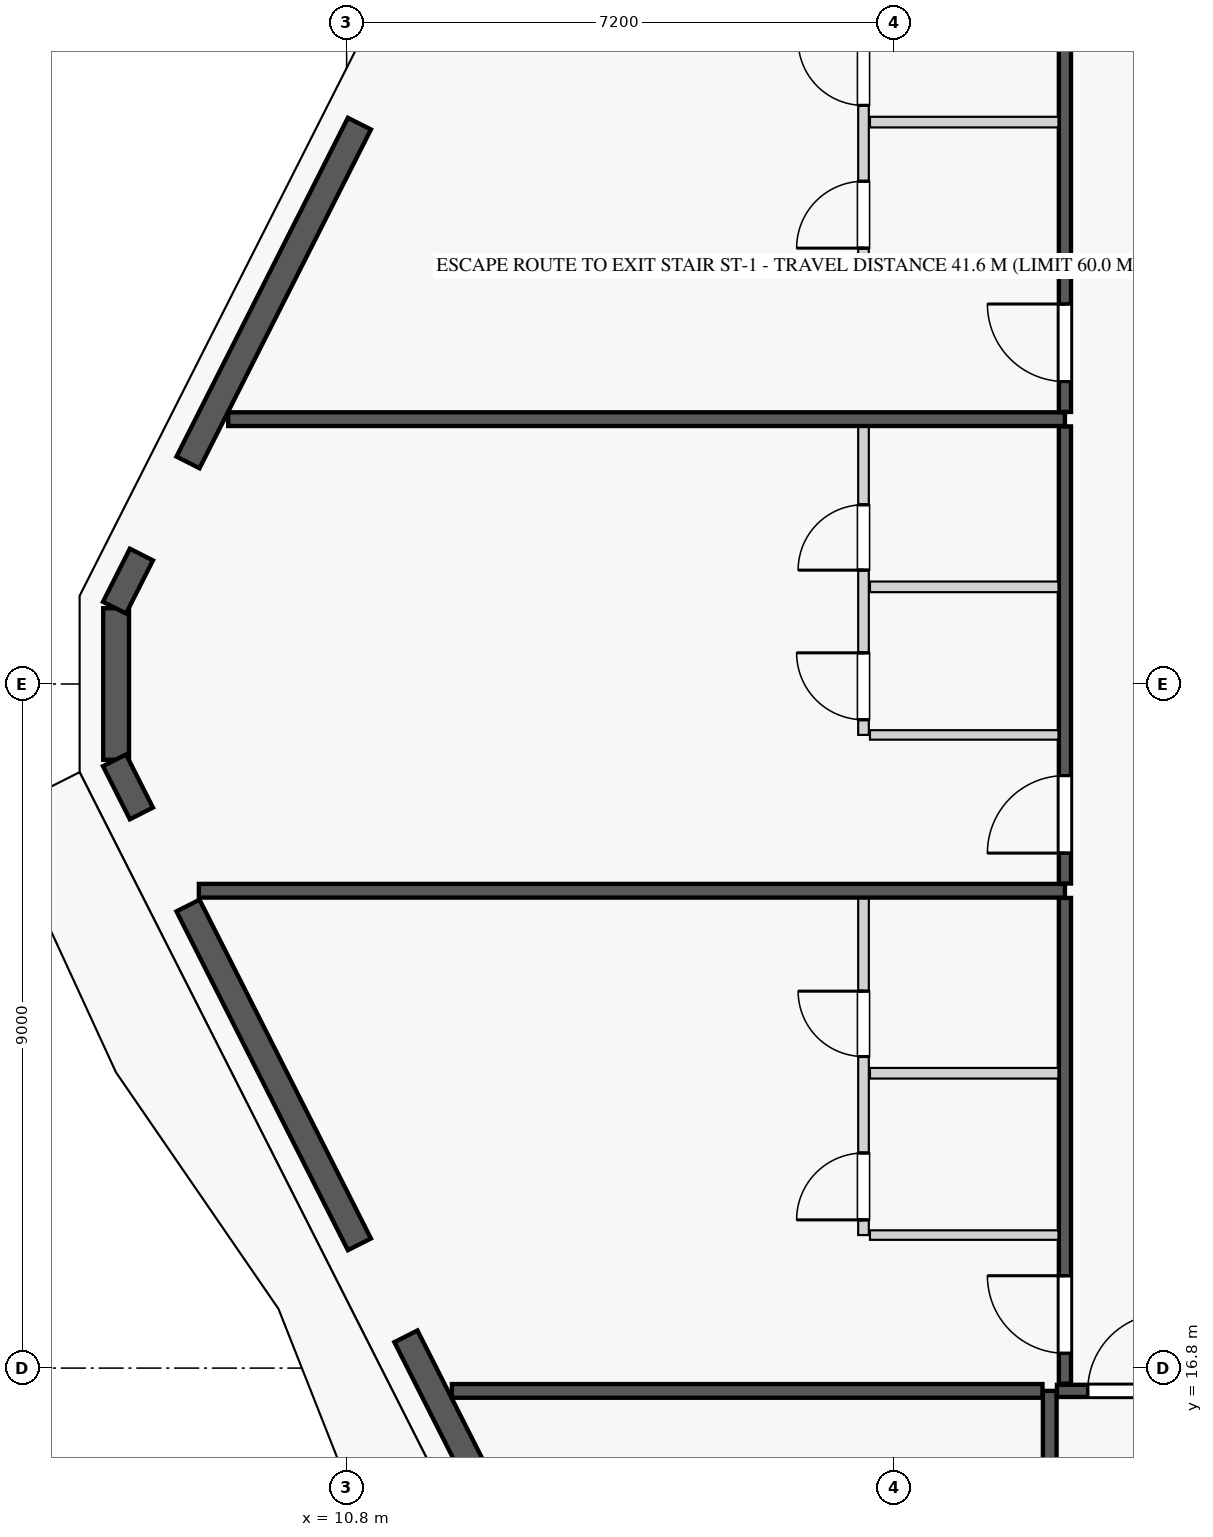
"""IFC4 building model, lengths in metres.
Left out: names, types, materials, properties, quantities, classifications, styles, units other than length and angle.
Written with IfcOpenShell. Run it as: python <this file> out.ifc"""

import sys

from ifc_helpers import new_model, si_unit, direction, frame, frame_2d, origin, origin_2d, place, context, subcontext, project, spatial, rectangle, extrude, element, fill, save


model = new_model("IFC4")
c1 = context("Model", 3, precision=1e-05, world=origin(), true_north=direction((0.0, 1.0)))
c2 = subcontext(c1, "Body", "Model", "MODEL_VIEW")
j1 = project(units=[si_unit("LENGTHUNIT", "METRE"), si_unit("PLANEANGLEUNIT", "RADIAN")], contexts=[c1])
p1 = place(None, origin())
s1 = spatial("IfcSite", under=j1, at=p1, CompositionType="ELEMENT")
p2 = place(p1, origin())
s2 = spatial("IfcBuilding", under=s1, at=p2, CompositionType="ELEMENT")
p3 = place(p2, frame((0.0, 0.0, 112.6)))
s3 = spatial("IfcBuildingStorey", under=s2, at=p3, CompositionType="ELEMENT", Elevation=112.6)
for number, where, z_axis, x_axis in (
    (1, (11.348, 33.776, 0.0), (0.0, 0.0, 1.0), (1.0, 0.0, 0.0)),
    (2, (8.443, 28.109, 0.0), (0.0, 0.0, 1.0), (1.0, 0.0, 0.0)),
    (3, (8.443, 23.491, 0.0), (0.0, 0.0, 1.0), (1.0, 0.0, 0.0)),
    (4, (11.348, 17.824, 0.0), (0.0, 0.0, 1.0), (1.0, 0.0, 0.0)),
):
    element("IfcColumn", number, at=place(p3, frame(where, z_axis=z_axis, x_axis=x_axis)), inside=s3, PredefinedType="COLUMN", context=c2, shape_type="SweptSolid", body=[
        extrude(rectangle(XDim=1.05, YDim=1.05, at=origin_2d()), origin(), (0.0, 0.0, 1.0), 3.55),
    ])
p4 = place(p3, frame((8.443, 25.8, 0.0), z_axis=(0.0, 0.0, 1.0), x_axis=(0.0, -1.0, 0.0)))
e5 = element("IfcColumn", 5, at=p4, inside=s3, PredefinedType="PILASTER", context=c2, shape_type="SweptSolid", body=[
    extrude(rectangle(XDim=0.5, YDim=0.35, at=origin_2d()), origin(), (0.0, 0.0, 1.0), 3.55),
])
p5 = place(p3, frame((7.767, 26.797, 0.0), z_axis=(0.0, 0.0, 1.0), x_axis=(0.0, -1.0, 0.0)))
e6 = element("IfcWall", 6, at=p5, inside=s3, PredefinedType="STANDARD", context=c2, shape_type="SweptSolid", body=[
    extrude(rectangle(XDim=1.994, YDim=0.34, at=frame_2d((0.997, 0.0))), origin(), (0.0, 0.0, 1.0), 3.34),
])
p6 = place(p5, frame((0.447, 0.0, 0.75)))
e7 = element("IfcOpeningElement", 7, at=p6, cuts=e6, PredefinedType="OPENING", context=c2, shape_type="SweptSolid", body=[
    extrude(rectangle(XDim=1.1, YDim=2.0, at=frame_2d((0.55, 1.0))), frame((0.0, 0.18, 0.0), z_axis=(0.0, -1.0, 0.0), x_axis=(1.0, 0.0, 0.0)), (0.0, 0.0, 1.0), 0.36),
])
p7 = place(p3, frame((10.968, 33.172, 0.0), z_axis=(0.0, 0.0, 1.0), x_axis=(-0.451470533039, -0.892286029139, 0.0)))
e8 = element("IfcWall", 8, at=p7, inside=s3, PredefinedType="STANDARD", context=c2, shape_type="SweptSolid", body=[
    extrude(rectangle(XDim=4.995, YDim=0.34, at=frame_2d((2.498, 0.0))), origin(), (0.0, 0.0, 1.0), 2.797),
])
p8 = place(p7, frame((1.947, 0.0, 0.75)))
e9 = element("IfcOpeningElement", 9, at=p8, cuts=e8, PredefinedType="OPENING", context=c2, shape_type="SweptSolid", body=[
    extrude(rectangle(XDim=1.1, YDim=1.897, at=frame_2d((0.55, 0.948))), frame((0.0, 0.18, 0.0), z_axis=(0.0, -1.0, 0.0), x_axis=(1.0, 0.0, 0.0)), (0.0, 0.0, 1.0), 0.36),
])
for number, where, z_axis, x_axis in (
    (10, (8.1, 27.503, 0.0), (0.0, 0.0, 1.0), (-0.452, -0.892, 0.0)),
    (11, (7.746, 24.796, 0.0), (0.0, 0.0, 1.0), (0.452, -0.892, 0.0)),
):
    element("IfcWall", number, at=place(p3, frame(where, z_axis=z_axis, x_axis=x_axis)), inside=s3, PredefinedType="STANDARD", context=c2, shape_type="SweptSolid", body=[
        extrude(rectangle(XDim=0.783, YDim=0.34, at=frame_2d((0.392, 0.0))), origin(), (0.0, 0.0, 1.0), 3.34),
    ])
p9 = place(p3, frame((8.713, 22.885, 0.0), z_axis=(0.0, 0.0, 1.0), x_axis=(0.451470533039, -0.892286029139, 0.0)))
e12 = element("IfcWall", 12, at=p9, inside=s3, PredefinedType="STANDARD", context=c2, shape_type="SweptSolid", body=[
    extrude(rectangle(XDim=4.995, YDim=0.34, at=frame_2d((2.498, 0.0))), origin(), (0.0, 0.0, 1.0), 2.797),
])
p10 = place(p9, frame((1.947, 0.0, 0.75)))
e13 = element("IfcOpeningElement", 13, at=p10, cuts=e12, PredefinedType="OPENING", context=c2, shape_type="SweptSolid", body=[
    extrude(rectangle(XDim=1.1, YDim=1.897, at=frame_2d((0.55, 0.948))), frame((0.0, 0.18, 0.0), z_axis=(0.0, -1.0, 0.0), x_axis=(1.0, 0.0, 0.0)), (0.0, 0.0, 1.0), 0.36),
])
p11 = place(p3, frame((11.58, 17.218, 0.0), z_axis=(0.0, 0.0, 1.0), x_axis=(0.451567731634, -0.892236842855, 0.0)))
e14 = element("IfcWall", 14, at=p11, inside=s3, PredefinedType="STANDARD", context=c2, shape_type="SweptSolid", body=[
    extrude(rectangle(XDim=5.219, YDim=0.34, at=frame_2d((2.61, 0.0))), origin(), (0.0, 0.0, 1.0), 2.797),
])
p12 = place(p11, frame((2.587, 0.0, 0.0)))
e15 = element("IfcOpeningElement", 15, at=p12, cuts=e14, PredefinedType="OPENING", context=c2, shape_type="SweptSolid", body=[
    extrude(rectangle(XDim=1.1, YDim=2.25, at=frame_2d((0.55, 1.125))), frame((0.0, 0.18, 0.0), z_axis=(0.0, -1.0, 0.0), x_axis=(1.0, 0.0, 0.0)), (0.0, 0.0, 1.0), 0.36),
])
p13 = place(p3, frame((20.05, 4.105, 0.0), z_axis=(0.0, 0.0, 1.0), x_axis=(0.0, 1.0, 0.0)))
e16 = element("IfcWall", 16, at=p13, inside=s3, PredefinedType="PARTITIONING", context=c2, shape_type="SweptSolid", body=[
    extrude(rectangle(XDim=12.395, YDim=0.18, at=frame_2d((6.198, 0.0))), origin(), (0.0, 0.0, 1.0), 3.34),
])
p14 = place(p3, frame((20.145, 16.5, 0.0), z_axis=(0.0, 0.0, 1.0), x_axis=(1.0, 0.0, 0.0)))
e17 = element("IfcWall", 17, at=p14, inside=s3, PredefinedType="PARTITIONING", context=c2, shape_type="SweptSolid", body=[
    extrude(rectangle(XDim=8.328, YDim=0.16, at=frame_2d((4.164, 0.0))), origin(), (0.0, 0.0, 1.0), 3.34),
])
p15 = place(p14, frame((0.405, 0.0, 0.0)))
e18 = element("IfcOpeningElement", 18, at=p15, cuts=e17, PredefinedType="OPENING", context=c2, shape_type="SweptSolid", body=[
    extrude(rectangle(XDim=1.02, YDim=2.25, at=frame_2d((0.51, 1.125))), frame((0.0, 0.09, 0.0), z_axis=(0.0, -1.0, 0.0), x_axis=(1.0, 0.0, 0.0)), (0.0, 0.0, 1.0), 0.18),
])
p16 = place(p3, frame((12.185, 16.5, 0.0), z_axis=(0.0, 0.0, 1.0), x_axis=(1.0, 0.0, 0.0)))
e19 = element("IfcWall", 19, at=p16, inside=s3, PredefinedType="PARTITIONING", context=c2, shape_type="SweptSolid", body=[
    extrude(rectangle(XDim=7.77, YDim=0.18, at=frame_2d((3.885, 0.0))), origin(), (0.0, 0.0, 1.0), 3.34),
])
p17 = place(p3, frame((20.25, 16.595, 0.0), z_axis=(0.0, 0.0, 1.0), x_axis=(0.0, 1.0, 0.0)))
e20 = element("IfcWall", 20, at=p17, inside=s3, PredefinedType="PARTITIONING", context=c2, shape_type="SweptSolid", body=[
    extrude(rectangle(XDim=6.39, YDim=0.16, at=frame_2d((3.195, 0.0))), origin(), (0.0, 0.0, 1.0), 3.34),
])
p18 = place(p17, frame((0.4, 0.0, 0.0)))
e21 = element("IfcOpeningElement", 21, at=p18, cuts=e20, PredefinedType="OPENING", context=c2, shape_type="SweptSolid", body=[
    extrude(rectangle(XDim=1.02, YDim=2.25, at=frame_2d((0.51, 1.125))), frame((0.0, 0.09, 0.0), z_axis=(0.0, -1.0, 0.0), x_axis=(1.0, 0.0, 0.0)), (0.0, 0.0, 1.0), 0.18),
])
p19 = place(p3, frame((17.685, 18.55, 0.0), z_axis=(0.0, 0.0, 1.0), x_axis=(1.0, 0.0, 0.0)))
e22 = element("IfcWall", 22, at=p19, inside=s3, PredefinedType="PARTITIONING", context=c2, shape_type="SweptSolid", body=[
    extrude(rectangle(XDim=2.48, YDim=0.125, at=frame_2d((1.24, 0.0))), origin(), (0.0, 0.0, 1.0), 2.722),
])
p20 = place(p3, frame((17.6, 18.55, 0.0), z_axis=(0.0, 0.0, 1.0), x_axis=(0.0, 1.0, 0.0)))
e23 = element("IfcWall", 23, at=p20, inside=s3, PredefinedType="PLUMBINGWALL", context=c2, shape_type="SweptSolid", body=[
    extrude(rectangle(XDim=4.435, YDim=0.14, at=frame_2d((2.218, 0.0))), origin(), (0.0, 0.0, 1.0), 3.34),
])
p21 = place(p20, frame((2.349, 0.0, 0.0)))
e24 = element("IfcOpeningElement", 24, at=p21, cuts=e23, PredefinedType="OPENING", context=c2, shape_type="SweptSolid", body=[
    extrude(rectangle(XDim=0.86, YDim=2.1, at=frame_2d((0.43, 1.05))), frame((0.0, 0.08, 0.0), z_axis=(0.0, -1.0, 0.0), x_axis=(1.0, 0.0, 0.0)), (0.0, 0.0, 1.0), 0.16),
])
p22 = place(p20, frame((0.2, 0.0, 0.0)))
e25 = element("IfcOpeningElement", 25, at=p22, cuts=e23, PredefinedType="OPENING", context=c2, shape_type="SweptSolid", body=[
    extrude(rectangle(XDim=0.88, YDim=2.15, at=frame_2d((0.44, 1.075))), frame((0.0, 0.08, 0.0), z_axis=(0.0, -1.0, 0.0), x_axis=(1.0, 0.0, 0.0)), (0.0, 0.0, 1.0), 0.16),
])
p23 = place(p3, frame((17.685, 20.679, 0.0), z_axis=(0.0, 0.0, 1.0), x_axis=(1.0, 0.0, 0.0)))
e26 = element("IfcWall", 26, at=p23, inside=s3, PredefinedType="PLUMBINGWALL", context=c2, shape_type="SweptSolid", body=[
    extrude(rectangle(XDim=2.48, YDim=0.14, at=frame_2d((1.24, 0.0))), origin(), (0.0, 0.0, 1.0), 3.34),
])
p24 = place(p3, frame((8.856, 23.08, 0.0), z_axis=(0.0, 0.0, 1.0), x_axis=(1.0, 0.0, 0.0)))
e27 = element("IfcWall", 27, at=p24, inside=s3, PredefinedType="PARTITIONING", context=c2, shape_type="SweptSolid", body=[
    extrude(rectangle(XDim=11.394, YDim=0.18, at=frame_2d((5.697, 0.0))), origin(), (0.0, 0.0, 1.0), 3.34),
])
p25 = place(p3, frame((20.25, 23.175, 0.0), z_axis=(0.0, 0.0, 1.0), x_axis=(0.0, 1.0, 0.0)))
e28 = element("IfcWall", 28, at=p25, inside=s3, PredefinedType="PARTITIONING", context=c2, shape_type="SweptSolid", body=[
    extrude(rectangle(XDim=6.014, YDim=0.16, at=frame_2d((3.007, 0.0))), origin(), (0.0, 0.0, 1.0), 3.34),
])
p26 = place(p25, frame((0.4, 0.0, 0.0)))
e29 = element("IfcOpeningElement", 29, at=p26, cuts=e28, PredefinedType="OPENING", context=c2, shape_type="SweptSolid", body=[
    extrude(rectangle(XDim=1.02, YDim=2.25, at=frame_2d((0.51, 1.125))), frame((0.0, 0.09, 0.0), z_axis=(0.0, -1.0, 0.0), x_axis=(1.0, 0.0, 0.0)), (0.0, 0.0, 1.0), 0.18),
])
p27 = place(p3, frame((17.685, 25.13, 0.0), z_axis=(0.0, 0.0, 1.0), x_axis=(1.0, 0.0, 0.0)))
e30 = element("IfcWall", 30, at=p27, inside=s3, PredefinedType="PARTITIONING", context=c2, shape_type="SweptSolid", body=[
    extrude(rectangle(XDim=2.48, YDim=0.125, at=frame_2d((1.24, 0.0))), origin(), (0.0, 0.0, 1.0), 3.34),
])
p28 = place(p3, frame((17.6, 25.13, 0.0), z_axis=(0.0, 0.0, 1.0), x_axis=(0.0, 1.0, 0.0)))
e31 = element("IfcWall", 31, at=p28, inside=s3, PredefinedType="PLUMBINGWALL", context=c2, shape_type="SweptSolid", body=[
    extrude(rectangle(XDim=4.059, YDim=0.14, at=frame_2d((2.03, 0.0))), origin(), (0.0, 0.0, 1.0), 3.34),
])
p29 = place(p28, frame((2.168, 0.0, 0.0)))
e32 = element("IfcOpeningElement", 32, at=p29, cuts=e31, PredefinedType="OPENING", context=c2, shape_type="SweptSolid", body=[
    extrude(rectangle(XDim=0.86, YDim=2.1, at=frame_2d((0.43, 1.05))), frame((0.0, 0.08, 0.0), z_axis=(0.0, -1.0, 0.0), x_axis=(1.0, 0.0, 0.0)), (0.0, 0.0, 1.0), 0.16),
])
p30 = place(p28, frame((0.2, 0.0, 0.0)))
e33 = element("IfcOpeningElement", 33, at=p30, cuts=e31, PredefinedType="OPENING", context=c2, shape_type="SweptSolid", body=[
    extrude(rectangle(XDim=0.88, YDim=2.15, at=frame_2d((0.44, 1.075))), frame((0.0, 0.08, 0.0), z_axis=(0.0, -1.0, 0.0), x_axis=(1.0, 0.0, 0.0)), (0.0, 0.0, 1.0), 0.16),
])
p31 = place(p3, frame((17.685, 27.078, 0.0), z_axis=(0.0, 0.0, 1.0), x_axis=(1.0, 0.0, 0.0)))
e34 = element("IfcWall", 34, at=p31, inside=s3, PredefinedType="PLUMBINGWALL", context=c2, shape_type="SweptSolid", body=[
    extrude(rectangle(XDim=2.48, YDim=0.14, at=frame_2d((1.24, 0.0))), origin(), (0.0, 0.0, 1.0), 3.34),
])
p32 = place(p3, frame((9.242, 29.284, 0.0), z_axis=(0.0, 0.0, 1.0), x_axis=(1.0, 0.0, 0.0)))
e35 = element("IfcWall", 35, at=p32, inside=s3, PredefinedType="PARTITIONING", context=c2, shape_type="SweptSolid", body=[
    extrude(rectangle(XDim=11.008, YDim=0.18, at=frame_2d((5.504, 0.0))), origin(), (0.0, 0.0, 1.0), 3.34),
])
p33 = place(p3, frame((20.25, 29.379, 0.0), z_axis=(0.0, 0.0, 1.0), x_axis=(0.0, 1.0, 0.0)))
e36 = element("IfcWall", 36, at=p33, inside=s3, PredefinedType="PARTITIONING", context=c2, shape_type="SweptSolid", body=[
    extrude(rectangle(XDim=5.826, YDim=0.16, at=frame_2d((2.913, 0.0))), origin(), (0.0, 0.0, 1.0), 3.34),
])
p34 = place(p33, frame((0.4, 0.0, 0.0)))
e37 = element("IfcOpeningElement", 37, at=p34, cuts=e36, PredefinedType="OPENING", context=c2, shape_type="SweptSolid", body=[
    extrude(rectangle(XDim=1.02, YDim=2.25, at=frame_2d((0.51, 1.125))), frame((0.0, 0.09, 0.0), z_axis=(0.0, -1.0, 0.0), x_axis=(1.0, 0.0, 0.0)), (0.0, 0.0, 1.0), 0.18),
])
p35 = place(p3, frame((17.685, 31.334, 0.0), z_axis=(0.0, 0.0, 1.0), x_axis=(1.0, 0.0, 0.0)))
e38 = element("IfcWall", 38, at=p35, inside=s3, PredefinedType="PARTITIONING", context=c2, shape_type="SweptSolid", body=[
    extrude(rectangle(XDim=2.48, YDim=0.125, at=frame_2d((1.24, 0.0))), origin(), (0.0, 0.0, 1.0), 3.34),
])
p36 = place(p3, frame((17.6, 31.334, 0.0), z_axis=(0.0, 0.0, 1.0), x_axis=(0.0, 1.0, 0.0)))
e39 = element("IfcWall", 39, at=p36, inside=s3, PredefinedType="PLUMBINGWALL", context=c2, shape_type="SweptSolid", body=[
    extrude(rectangle(XDim=3.871, YDim=0.14, at=frame_2d((1.936, 0.0))), origin(), (0.0, 0.0, 1.0), 3.34),
])
p37 = place(p36, frame((2.078, 0.0, 0.0)))
e40 = element("IfcOpeningElement", 40, at=p37, cuts=e39, PredefinedType="OPENING", context=c2, shape_type="SweptSolid", body=[
    extrude(rectangle(XDim=0.86, YDim=2.1, at=frame_2d((0.43, 1.05))), frame((0.0, 0.08, 0.0), z_axis=(0.0, -1.0, 0.0), x_axis=(1.0, 0.0, 0.0)), (0.0, 0.0, 1.0), 0.16),
])
p38 = place(p36, frame((0.2, 0.0, 0.0)))
e41 = element("IfcOpeningElement", 41, at=p38, cuts=e39, PredefinedType="OPENING", context=c2, shape_type="SweptSolid", body=[
    extrude(rectangle(XDim=0.88, YDim=2.15, at=frame_2d((0.44, 1.075))), frame((0.0, 0.08, 0.0), z_axis=(0.0, -1.0, 0.0), x_axis=(1.0, 0.0, 0.0)), (0.0, 0.0, 1.0), 0.16),
])
p39 = place(p3, frame((17.685, 33.192, 0.0), z_axis=(0.0, 0.0, 1.0), x_axis=(1.0, 0.0, 0.0)))
e42 = element("IfcWall", 42, at=p39, inside=s3, PredefinedType="PLUMBINGWALL", context=c2, shape_type="SweptSolid", body=[
    extrude(rectangle(XDim=2.48, YDim=0.14, at=frame_2d((1.24, 0.0))), origin(), (0.0, 0.0, 1.0), 2.722),
])
p40 = place(p8, origin())
e43 = element("IfcWindow", 43, at=p40, inside=s3, PartitioningType="SINGLE_PANEL", PredefinedType="WINDOW", context=c2, shape_type="SweptSolid", body=[
    extrude(rectangle(XDim=1.1, YDim=1.897, at=frame_2d((0.55, 0.948))), frame((0.0, 0.03, 0.0), z_axis=(0.0, -1.0, 0.0), x_axis=(1.0, 0.0, 0.0)), (0.0, 0.0, 1.0), 0.06),
])
fill(e9, e43)
p41 = place(p10, origin())
e44 = element("IfcWindow", 44, at=p41, inside=s3, PartitioningType="SINGLE_PANEL", PredefinedType="WINDOW", context=c2, shape_type="SweptSolid", body=[
    extrude(rectangle(XDim=1.1, YDim=1.897, at=frame_2d((0.55, 0.948))), frame((0.0, 0.03, 0.0), z_axis=(0.0, -1.0, 0.0), x_axis=(1.0, 0.0, 0.0)), (0.0, 0.0, 1.0), 0.06),
])
fill(e13, e44)
p42 = place(p15, origin())
e45 = element("IfcDoor", 45, at=p42, inside=s3, OperationType="SINGLE_SWING_RIGHT", PredefinedType="DOOR", context=c2, shape_type="SweptSolid", body=[
    extrude(rectangle(XDim=1.02, YDim=2.25, at=frame_2d((0.51, 1.125))), frame((0.0, 0.025, 0.0), z_axis=(0.0, -1.0, 0.0), x_axis=(1.0, 0.0, 0.0)), (0.0, 0.0, 1.0), 0.05),
])
fill(e18, e45)
p43 = place(p21, origin())
e46 = element("IfcDoor", 46, at=p43, inside=s3, OperationType="SINGLE_SWING_RIGHT", PredefinedType="DOOR", context=c2, shape_type="SweptSolid", body=[
    extrude(rectangle(XDim=0.86, YDim=2.1, at=frame_2d((0.43, 1.05))), frame((0.0, 0.025, 0.0), z_axis=(0.0, -1.0, 0.0), x_axis=(1.0, 0.0, 0.0)), (0.0, 0.0, 1.0), 0.05),
])
fill(e24, e46)
p44 = place(p18, origin())
e47 = element("IfcDoor", 47, at=p44, inside=s3, OperationType="SINGLE_SWING_RIGHT", PredefinedType="DOOR", context=c2, shape_type="SweptSolid", body=[
    extrude(rectangle(XDim=1.02, YDim=2.25, at=frame_2d((0.51, 1.125))), frame((0.0, 0.025, 0.0), z_axis=(0.0, -1.0, 0.0), x_axis=(1.0, 0.0, 0.0)), (0.0, 0.0, 1.0), 0.05),
])
fill(e21, e47)
p45 = place(p22, origin())
e48 = element("IfcDoor", 48, at=p45, inside=s3, OperationType="SINGLE_SWING_LEFT", PredefinedType="DOOR", context=c2, shape_type="SweptSolid", body=[
    extrude(rectangle(XDim=0.88, YDim=2.15, at=frame_2d((0.44, 1.075))), frame((0.0, 0.025, 0.0), z_axis=(0.0, -1.0, 0.0), x_axis=(1.0, 0.0, 0.0)), (0.0, 0.0, 1.0), 0.05),
])
fill(e25, e48)
p46 = place(p29, origin())
e49 = element("IfcDoor", 49, at=p46, inside=s3, OperationType="SINGLE_SWING_LEFT", PredefinedType="DOOR", context=c2, shape_type="SweptSolid", body=[
    extrude(rectangle(XDim=0.86, YDim=2.1, at=frame_2d((0.43, 1.05))), frame((0.0, 0.025, 0.0), z_axis=(0.0, -1.0, 0.0), x_axis=(1.0, 0.0, 0.0)), (0.0, 0.0, 1.0), 0.05),
])
fill(e32, e49)
p47 = place(p26, origin())
e50 = element("IfcDoor", 50, at=p47, inside=s3, OperationType="SINGLE_SWING_LEFT", PredefinedType="DOOR", context=c2, shape_type="SweptSolid", body=[
    extrude(rectangle(XDim=1.02, YDim=2.25, at=frame_2d((0.51, 1.125))), frame((0.0, 0.025, 0.0), z_axis=(0.0, -1.0, 0.0), x_axis=(1.0, 0.0, 0.0)), (0.0, 0.0, 1.0), 0.05),
])
fill(e29, e50)
p48 = place(p30, origin())
e51 = element("IfcDoor", 51, at=p48, inside=s3, OperationType="SINGLE_SWING_RIGHT", PredefinedType="DOOR", context=c2, shape_type="SweptSolid", body=[
    extrude(rectangle(XDim=0.88, YDim=2.15, at=frame_2d((0.44, 1.075))), frame((0.0, 0.025, 0.0), z_axis=(0.0, -1.0, 0.0), x_axis=(1.0, 0.0, 0.0)), (0.0, 0.0, 1.0), 0.05),
])
fill(e33, e51)
p49 = place(p37, origin())
e52 = element("IfcDoor", 52, at=p49, inside=s3, OperationType="SINGLE_SWING_RIGHT", PredefinedType="DOOR", context=c2, shape_type="SweptSolid", body=[
    extrude(rectangle(XDim=0.86, YDim=2.1, at=frame_2d((0.43, 1.05))), frame((0.0, 0.025, 0.0), z_axis=(0.0, -1.0, 0.0), x_axis=(1.0, 0.0, 0.0)), (0.0, 0.0, 1.0), 0.05),
])
fill(e40, e52)
p50 = place(p34, origin())
e53 = element("IfcDoor", 53, at=p50, inside=s3, OperationType="SINGLE_SWING_RIGHT", PredefinedType="DOOR", context=c2, shape_type="SweptSolid", body=[
    extrude(rectangle(XDim=1.02, YDim=2.25, at=frame_2d((0.51, 1.125))), frame((0.0, 0.025, 0.0), z_axis=(0.0, -1.0, 0.0), x_axis=(1.0, 0.0, 0.0)), (0.0, 0.0, 1.0), 0.05),
])
fill(e37, e53)
p51 = place(p38, origin())
e54 = element("IfcDoor", 54, at=p51, inside=s3, OperationType="SINGLE_SWING_LEFT", PredefinedType="DOOR", context=c2, shape_type="SweptSolid", body=[
    extrude(rectangle(XDim=0.88, YDim=2.15, at=frame_2d((0.44, 1.075))), frame((0.0, 0.025, 0.0), z_axis=(0.0, -1.0, 0.0), x_axis=(1.0, 0.0, 0.0)), (0.0, 0.0, 1.0), 0.05),
])
fill(e41, e54)
p52 = place(p6, origin())
e55 = element("IfcWindow", 55, at=p52, inside=s3, PartitioningType="SINGLE_PANEL", PredefinedType="WINDOW", context=c2, shape_type="SweptSolid", body=[
    extrude(rectangle(XDim=1.1, YDim=2.0, at=frame_2d((0.55, 1.0))), frame((0.0, 0.03, 0.0), z_axis=(0.0, -1.0, 0.0), x_axis=(1.0, 0.0, 0.0)), (0.0, 0.0, 1.0), 0.06),
])
fill(e7, e55)
save(model, sys.argv[1])
